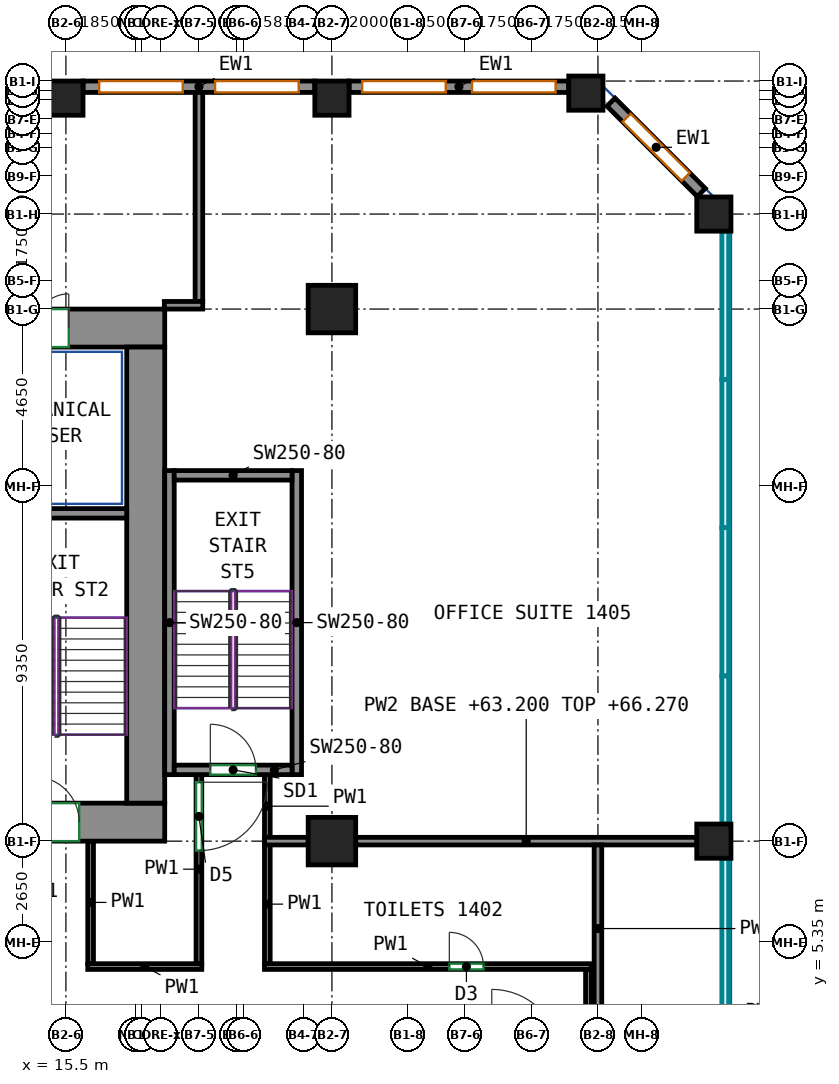
"""IFC4 building model, lengths in metres.
Left out: names, types, materials, properties, quantities, classifications, styles, units other than length and angle.
Written with IfcOpenShell. Run it as: python <this file> out.ifc"""

import sys

from ifc_helpers import new_model, si_unit, direction, frame, frame_2d, origin, origin_2d, place, context, subcontext, project, spatial, rectangle, extrude, source, transform, mapped, element, fill, save


model = new_model("IFC4")
c1 = context("Model", 3, precision=1e-05, world=origin(), true_north=direction((0.0, 1.0)))
c2 = subcontext(c1, "Body", "Model", "MODEL_VIEW")
j1 = project(units=[si_unit("LENGTHUNIT", "METRE"), si_unit("PLANEANGLEUNIT", "RADIAN")], contexts=[c1])
p1 = place(None, origin())
s1 = spatial("IfcSite", under=j1, at=p1, CompositionType="ELEMENT")
p2 = place(p1, origin())
s2 = spatial("IfcBuilding", under=s1, at=p2, CompositionType="ELEMENT")
p3 = place(p2, frame((0.0, 0.0, 63.2)))
s3 = spatial("IfcBuildingStorey", under=s2, at=p3, CompositionType="ELEMENT", Elevation=63.2)
m1 = source(origin(), c2, "Body", "SweptSolid", [
    extrude(rectangle(XDim=0.9, YDim=0.9, at=origin_2d()), origin(), (0.0, 0.0, 1.0), 3.72),
])
p4 = place(p3, frame((15.5, 27.55, 0.0), z_axis=(0.0, 0.0, 1.0), x_axis=(1.0, 0.0, 0.0)))
e1 = element("IfcColumn", 1, at=p4, inside=s3, PredefinedType="COLUMN", context=c2, shape_type="MappedRepresentation", body=[
    mapped(m1, transform((0.0, 0.0, 0.0))),
])
m2 = source(origin(), c2, "Body", "SweptSolid", [
    extrude(rectangle(XDim=1.25, YDim=1.25, at=origin_2d()), origin(), (0.0, 0.0, 1.0), 3.72),
])
for number, where, z_axis, x_axis in (
    (2, (22.5, 8.0, 0.0), (0.0, 0.0, 1.0), (1.0, 0.0, 0.0)),
    (3, (22.5, 22.0, 0.0), (0.0, 0.0, 1.0), (1.0, 0.0, 0.0)),
):
    element("IfcColumn", number, at=place(p3, frame(where, z_axis=z_axis, x_axis=x_axis)), inside=s3, PredefinedType="COLUMN", context=c2, shape_type="MappedRepresentation", body=[
        mapped(m2, transform((0.0, 0.0, 0.0))),
    ])
for number, where, z_axis, x_axis in (
    (4, (22.5, 27.55, 0.0), (0.0, 0.0, 1.0), (1.0, 0.0, 0.0)),
    (5, (29.182, 27.682, 0.0), (0.0, 0.0, 1.0), (1.0, 0.0, 0.0)),
    (6, (32.55, 8.0, 0.0), (0.0, 0.0, 1.0), (1.0, 0.0, 0.0)),
    (7, (32.55, 24.5, 0.0), (0.0, 0.0, 1.0), (1.0, 0.0, 0.0)),
):
    element("IfcColumn", number, at=place(p3, frame(where, z_axis=z_axis, x_axis=x_axis)), inside=s3, PredefinedType="COLUMN", context=c2, shape_type="MappedRepresentation", body=[
        mapped(m1, transform((0.0, 0.0, 0.0))),
    ])
m3 = source(origin(), c2, "Body", "SweptSolid", [
    extrude(rectangle(XDim=5.63, YDim=1.0, at=frame_2d((2.815, 0.0))), origin(), (0.0, 0.0, 1.0), 3.72),
])
p5 = place(p3, frame((12.47, 8.5, 0.0), z_axis=(0.0, 0.0, 1.0), x_axis=(1.0, 0.0, 0.0)))
e8 = element("IfcWall", 8, at=p5, inside=s3, PredefinedType="SHEAR", context=c2, shape_type="MappedRepresentation", body=[
    mapped(m3, transform((0.0, 0.0, 0.0))),
])
p6 = place(p5, frame((2.18, 0.0, 0.0)))
e9 = element("IfcOpeningElement", 9, at=p6, cuts=e8, PredefinedType="OPENING", context=c2, shape_type="SweptSolid", body=[
    extrude(rectangle(XDim=1.2, YDim=2.1, at=frame_2d((0.6, 1.05))), frame((0.0, 0.51, 0.0), z_axis=(0.0, -1.0, 0.0), x_axis=(1.0, 0.0, 0.0)), (0.0, 0.0, 1.0), 1.02),
])
m4 = source(origin(), c2, "Body", "SweptSolid", [
    extrude(rectangle(XDim=34.1, YDim=1.0, at=frame_2d((17.05, 0.0))), origin(), (0.0, 0.0, 1.0), 3.72),
])
p7 = place(p3, frame((-16.0, 21.5, 0.0), z_axis=(0.0, 0.0, 1.0), x_axis=(1.0, 0.0, 0.0)))
e10 = element("IfcWall", 10, at=p7, inside=s3, PredefinedType="SHEAR", context=c2, shape_type="MappedRepresentation", body=[
    mapped(m4, transform((0.0, 0.0, 0.0))),
])
p8 = place(p7, frame((6.108, 0.0, 0.0)))
e11 = element("IfcOpeningElement", 11, at=p8, cuts=e10, PredefinedType="OPENING", context=c2, shape_type="SweptSolid", body=[
    extrude(rectangle(XDim=0.9, YDim=2.1, at=frame_2d((0.45, 1.05))), frame((0.0, 0.51, 0.0), z_axis=(0.0, -1.0, 0.0), x_axis=(1.0, 0.0, 0.0)), (0.0, 0.0, 1.0), 1.02),
])
p9 = place(p7, frame((11.173, 0.0, 0.0)))
e12 = element("IfcOpeningElement", 12, at=p9, cuts=e10, PredefinedType="OPENING", context=c2, shape_type="SweptSolid", body=[
    extrude(rectangle(XDim=0.9, YDim=2.1, at=frame_2d((0.45, 1.05))), frame((0.0, 0.51, 0.0), z_axis=(0.0, -1.0, 0.0), x_axis=(1.0, 0.0, 0.0)), (0.0, 0.0, 1.0), 1.02),
])
p10 = place(p7, frame((16.238, 0.0, 0.0)))
e13 = element("IfcOpeningElement", 13, at=p10, cuts=e10, PredefinedType="OPENING", context=c2, shape_type="SweptSolid", body=[
    extrude(rectangle(XDim=0.9, YDim=2.1, at=frame_2d((0.45, 1.05))), frame((0.0, 0.51, 0.0), z_axis=(0.0, -1.0, 0.0), x_axis=(1.0, 0.0, 0.0)), (0.0, 0.0, 1.0), 1.02),
])
p11 = place(p7, frame((21.062, 0.0, 0.0)))
e14 = element("IfcOpeningElement", 14, at=p11, cuts=e10, PredefinedType="OPENING", context=c2, shape_type="SweptSolid", body=[
    extrude(rectangle(XDim=0.9, YDim=2.1, at=frame_2d((0.45, 1.05))), frame((0.0, 0.51, 0.0), z_axis=(0.0, -1.0, 0.0), x_axis=(1.0, 0.0, 0.0)), (0.0, 0.0, 1.0), 1.02),
])
p12 = place(p7, frame((26.489, 0.0, 0.0)))
e15 = element("IfcOpeningElement", 15, at=p12, cuts=e10, PredefinedType="OPENING", context=c2, shape_type="SweptSolid", body=[
    extrude(rectangle(XDim=0.9, YDim=2.1, at=frame_2d((0.45, 1.05))), frame((0.0, 0.51, 0.0), z_axis=(0.0, -1.0, 0.0), x_axis=(1.0, 0.0, 0.0)), (0.0, 0.0, 1.0), 1.02),
])
p13 = place(p7, frame((2.525, 0.0, 0.0)))
e16 = element("IfcOpeningElement", 16, at=p13, cuts=e10, PredefinedType="OPENING", context=c2, shape_type="SweptSolid", body=[
    extrude(rectangle(XDim=0.9, YDim=2.1, at=frame_2d((0.45, 1.05))), frame((0.0, 0.51, 0.0), z_axis=(0.0, -1.0, 0.0), x_axis=(1.0, 0.0, 0.0)), (0.0, 0.0, 1.0), 1.02),
])
p14 = place(p7, frame((30.675, 0.0, 0.0)))
e17 = element("IfcOpeningElement", 17, at=p14, cuts=e10, PredefinedType="OPENING", context=c2, shape_type="SweptSolid", body=[
    extrude(rectangle(XDim=0.9, YDim=2.1, at=frame_2d((0.45, 1.05))), frame((0.0, 0.51, 0.0), z_axis=(0.0, -1.0, 0.0), x_axis=(1.0, 0.0, 0.0)), (0.0, 0.0, 1.0), 1.02),
])
m5 = source(origin(), c2, "Body", "SweptSolid", [
    extrude(rectangle(XDim=12.0, YDim=1.0, at=frame_2d((6.0, 0.0))), origin(), (0.0, 0.0, 1.0), 3.72),
])
p15 = place(p3, frame((17.6, 9.0, 0.0), z_axis=(0.0, 0.0, 1.0), x_axis=(0.0, 1.0, 0.0)))
e18 = element("IfcWall", 18, at=p15, inside=s3, PredefinedType="SHEAR", context=c2, shape_type="MappedRepresentation", body=[
    mapped(m5, transform((0.0, 0.0, 0.0))),
])
m6 = source(origin(), c2, "Body", "SweptSolid", [
    extrude(rectangle(XDim=3.7, YDim=0.25, at=frame_2d((1.85, 0.0))), origin(), (0.0, 0.0, 1.0), 3.72),
])
p16 = place(p3, frame((13.4, 16.625, 0.0), z_axis=(0.0, 0.0, 1.0), x_axis=(1.0, 0.0, 0.0)))
e19 = element("IfcWall", 19, at=p16, inside=s3, PredefinedType="SHEAR", context=c2, shape_type="MappedRepresentation", body=[
    mapped(m6, transform((0.0, 0.0, 0.0))),
])
m7 = source(origin(), c2, "Body", "SweptSolid", [
    extrude(rectangle(XDim=8.0, YDim=0.25, at=frame_2d((4.0, 0.0))), origin(), (0.0, 0.0, 1.0), 3.72),
])
for number, where, z_axis, x_axis in (
    (20, (18.225, 9.75, 0.0), (0.0, 0.0, 1.0), (0.0, 1.0, 0.0)),
    (21, (21.575, 9.75, 0.0), (0.0, 0.0, 1.0), (0.0, 1.0, 0.0)),
):
    element("IfcWall", number, at=place(p3, frame(where, z_axis=z_axis, x_axis=x_axis)), inside=s3, PredefinedType="SHEAR", context=c2, shape_type="MappedRepresentation", body=[
        mapped(m7, transform((0.0, 0.0, 0.0))),
    ])
m8 = source(origin(), c2, "Body", "SweptSolid", [
    extrude(rectangle(XDim=3.1, YDim=0.25, at=frame_2d((1.55, 0.0))), origin(), (0.0, 0.0, 1.0), 3.72),
])
p17 = place(p3, frame((18.35, 9.875, 0.0), z_axis=(0.0, 0.0, 1.0), x_axis=(1.0, 0.0, 0.0)))
e22 = element("IfcWall", 22, at=p17, inside=s3, PredefinedType="SHEAR", context=c2, shape_type="MappedRepresentation", body=[
    mapped(m8, transform((0.0, 0.0, 0.0))),
])
p18 = place(p17, frame((0.95, 0.0, 0.0)))
e23 = element("IfcOpeningElement", 23, at=p18, cuts=e22, PredefinedType="OPENING", context=c2, shape_type="SweptSolid", body=[
    extrude(rectangle(XDim=1.2, YDim=2.1, at=frame_2d((0.6, 1.05))), frame((0.0, 0.135, 0.0), z_axis=(0.0, -1.0, 0.0), x_axis=(1.0, 0.0, 0.0)), (0.0, 0.0, 1.0), 0.27),
])
p19 = place(p3, frame((18.35, 17.625, 0.0), z_axis=(0.0, 0.0, 1.0), x_axis=(1.0, 0.0, 0.0)))
e24 = element("IfcWall", 24, at=p19, inside=s3, PredefinedType="SHEAR", context=c2, shape_type="MappedRepresentation", body=[
    mapped(m8, transform((0.0, 0.0, 0.0))),
])
m9 = source(origin(), c2, "Body", "SweptSolid", [
    extrude(rectangle(XDim=3.359, YDim=0.3, at=frame_2d((1.679, 0.0))), origin(), (0.0, 0.0, 1.0), 3.72),
])
p20 = place(p3, frame((32.219, 25.069, 0.0), z_axis=(0.0, 0.0, 1.0), x_axis=(-0.707070438228, 0.707143122278, 0.0)))
e25 = element("IfcWall", 25, at=p20, inside=s3, PredefinedType="SOLIDWALL", context=c2, shape_type="MappedRepresentation", body=[
    mapped(m9, transform((0.0, 0.0, 0.0))),
])
p21 = place(p20, frame((0.579, 0.0, 0.7)))
e26 = element("IfcOpeningElement", 26, at=p21, cuts=e25, PredefinedType="OPENING", context=c2, shape_type="SweptSolid", body=[
    extrude(rectangle(XDim=2.2, YDim=2.25, at=frame_2d((1.1, 1.125))), frame((0.0, 0.16, 0.0), z_axis=(0.0, -1.0, 0.0), x_axis=(1.0, 0.0, 0.0)), (0.0, 0.0, 1.0), 0.32),
])
m10 = source(origin(), c2, "Body", "SweptSolid", [
    extrude(rectangle(XDim=5.782, YDim=0.3, at=frame_2d((2.891, 0.0))), origin(), (0.0, 0.0, 1.0), 3.72),
])
p22 = place(p3, frame((28.732, 27.85, 0.0), z_axis=(0.0, 0.0, 1.0), x_axis=(-1.0, 0.0, 0.0)))
e27 = element("IfcWall", 27, at=p22, inside=s3, PredefinedType="SOLIDWALL", context=c2, shape_type="MappedRepresentation", body=[
    mapped(m10, transform((0.0, 0.0, 0.0))),
])
p23 = place(p22, frame((0.345, 0.0, 0.7)))
e28 = element("IfcOpeningElement", 28, at=p23, cuts=e27, PredefinedType="OPENING", context=c2, shape_type="SweptSolid", body=[
    extrude(rectangle(XDim=2.2, YDim=2.25, at=frame_2d((1.1, 1.125))), frame((0.0, 0.16, 0.0), z_axis=(0.0, -1.0, 0.0), x_axis=(1.0, 0.0, 0.0)), (0.0, 0.0, 1.0), 0.32),
])
p24 = place(p22, frame((3.236, 0.0, 0.7)))
e29 = element("IfcOpeningElement", 29, at=p24, cuts=e27, PredefinedType="OPENING", context=c2, shape_type="SweptSolid", body=[
    extrude(rectangle(XDim=2.2, YDim=2.25, at=frame_2d((1.1, 1.125))), frame((0.0, 0.16, 0.0), z_axis=(0.0, -1.0, 0.0), x_axis=(1.0, 0.0, 0.0)), (0.0, 0.0, 1.0), 0.32),
])
m11 = source(origin(), c2, "Body", "SweptSolid", [
    extrude(rectangle(XDim=6.1, YDim=0.3, at=frame_2d((3.05, 0.0))), origin(), (0.0, 0.0, 1.0), 3.72),
])
p25 = place(p3, frame((22.05, 27.85, 0.0), z_axis=(0.0, 0.0, 1.0), x_axis=(-1.0, 0.0, 0.0)))
e30 = element("IfcWall", 30, at=p25, inside=s3, PredefinedType="SOLIDWALL", context=c2, shape_type="MappedRepresentation", body=[
    mapped(m11, transform((0.0, 0.0, 0.0))),
])
p26 = place(p25, frame((0.425, 0.0, 0.7)))
e31 = element("IfcOpeningElement", 31, at=p26, cuts=e30, PredefinedType="OPENING", context=c2, shape_type="SweptSolid", body=[
    extrude(rectangle(XDim=2.2, YDim=2.25, at=frame_2d((1.1, 1.125))), frame((0.0, 0.16, 0.0), z_axis=(0.0, -1.0, 0.0), x_axis=(1.0, 0.0, 0.0)), (0.0, 0.0, 1.0), 0.32),
])
p27 = place(p25, frame((3.475, 0.0, 0.7)))
e32 = element("IfcOpeningElement", 32, at=p27, cuts=e30, PredefinedType="OPENING", context=c2, shape_type="SweptSolid", body=[
    extrude(rectangle(XDim=2.2, YDim=2.25, at=frame_2d((1.1, 1.125))), frame((0.0, 0.16, 0.0), z_axis=(0.0, -1.0, 0.0), x_axis=(1.0, 0.0, 0.0)), (0.0, 0.0, 1.0), 0.32),
])
p28 = place(p3, frame((16.15, 4.775, 0.0), z_axis=(0.0, 0.0, 1.0), x_axis=(0.0, 1.0, 0.0)))
e33 = element("IfcWall", 33, at=p28, inside=s3, PredefinedType="PARTITIONING", context=c2, shape_type="SweptSolid", body=[
    extrude(rectangle(XDim=3.225, YDim=0.15, at=frame_2d((1.613, 0.0))), origin(), (0.0, 0.0, 1.0), 3.72),
])
p29 = place(p3, frame((16.075, 4.7, 0.0), z_axis=(0.0, 0.0, 1.0), x_axis=(1.0, 0.0, 0.0)))
e34 = element("IfcWall", 34, at=p29, inside=s3, PredefinedType="PARTITIONING", context=c2, shape_type="SweptSolid", body=[
    extrude(rectangle(XDim=3.0, YDim=0.15, at=frame_2d((1.5, 0.0))), origin(), (0.0, 0.0, 1.0), 3.72),
])
p30 = place(p3, frame((19.0, 9.75, 0.0), z_axis=(0.0, 0.0, 1.0), x_axis=(0.0, -1.0, 0.0)))
e35 = element("IfcWall", 35, at=p30, inside=s3, PredefinedType="PARTITIONING", context=c2, shape_type="SweptSolid", body=[
    extrude(rectangle(XDim=4.975, YDim=0.15, at=frame_2d((2.488, 0.0))), origin(), (0.0, 0.0, 1.0), 3.72),
])
p31 = place(p30, frame((0.2, 0.0, 0.0)))
e36 = element("IfcOpeningElement", 36, at=p31, cuts=e35, PredefinedType="OPENING", context=c2, shape_type="SweptSolid", body=[
    extrude(rectangle(XDim=1.8, YDim=2.1, at=frame_2d((0.9, 1.05))), frame((0.0, 0.085, 0.0), z_axis=(0.0, -1.0, 0.0), x_axis=(1.0, 0.0, 0.0)), (0.0, 0.0, 1.0), 0.17),
])
p32 = place(p3, frame((20.8, 8.09, 0.0), z_axis=(0.0, 0.0, 1.0), x_axis=(0.0, 1.0, 0.0)))
e37 = element("IfcWall", 37, at=p32, inside=s3, PredefinedType="PARTITIONING", context=c2, shape_type="SweptSolid", body=[
    extrude(rectangle(XDim=1.66, YDim=0.15, at=frame_2d((0.83, 0.0))), origin(), (0.0, 0.0, 1.0), 3.72),
])
p33 = place(p3, frame((20.8, 4.775, 0.0), z_axis=(0.0, 0.0, 1.0), x_axis=(0.0, 1.0, 0.0)))
e38 = element("IfcWall", 38, at=p33, inside=s3, PredefinedType="PARTITIONING", context=c2, shape_type="SweptSolid", body=[
    extrude(rectangle(XDim=3.135, YDim=0.15, at=frame_2d((1.567, 0.0))), origin(), (0.0, 0.0, 1.0), 3.72),
])
p34 = place(p3, frame((20.725, 4.7, 0.0), z_axis=(0.0, 0.0, 1.0), x_axis=(1.0, 0.0, 0.0)))
e39 = element("IfcWall", 39, at=p34, inside=s3, PredefinedType="PARTITIONING", context=c2, shape_type="SweptSolid", body=[
    extrude(rectangle(XDim=8.6, YDim=0.15, at=frame_2d((4.3, 0.0))), origin(), (0.0, 0.0, 1.0), 3.72),
])
p35 = place(p34, frame((4.864, 0.0, 0.0)))
e40 = element("IfcOpeningElement", 40, at=p35, cuts=e39, PredefinedType="OPENING", context=c2, shape_type="SweptSolid", body=[
    extrude(rectangle(XDim=0.9, YDim=2.1, at=frame_2d((0.45, 1.05))), frame((0.0, 0.085, 0.0), z_axis=(0.0, -1.0, 0.0), x_axis=(1.0, 0.0, 0.0)), (0.0, 0.0, 1.0), 0.17),
])
p36 = place(p3, frame((29.25, 2.375, 0.0), z_axis=(0.0, 0.0, 1.0), x_axis=(0.0, 1.0, 0.0)))
e41 = element("IfcWall", 41, at=p36, inside=s3, PredefinedType="PARTITIONING", context=c2, shape_type="SweptSolid", body=[
    extrude(rectangle(XDim=2.25, YDim=0.15, at=frame_2d((1.125, 0.0))), origin(), (0.0, 0.0, 1.0), 3.07),
])
p37 = place(p3, frame((19.0, 22.2, 0.0), z_axis=(0.0, 0.0, 1.0), x_axis=(0.0, 1.0, 0.0)))
e42 = element("IfcWall", 42, at=p37, inside=s3, PredefinedType="PARTITIONING", context=c2, shape_type="SweptSolid", body=[
    extrude(rectangle(XDim=5.55, YDim=0.2, at=frame_2d((2.775, 0.0))), origin(), (0.0, 0.0, 1.0), 3.72),
])
p38 = place(p3, frame((18.09, 22.1, 0.0), z_axis=(0.0, 0.0, 1.0), x_axis=(1.0, 0.0, 0.0)))
e43 = element("IfcWall", 43, at=p38, inside=s3, PredefinedType="PARTITIONING", context=c2, shape_type="SweptSolid", body=[
    extrude(rectangle(XDim=1.01, YDim=0.2, at=frame_2d((0.505, 0.0))), origin(), (0.0, 0.0, 1.0), 3.72),
])
p39 = place(p3, frame((23.125, 8.0, 0.0), z_axis=(0.0, 0.0, 1.0), x_axis=(1.0, 0.0, 0.0)))
e44 = element("IfcWall", 44, at=p39, inside=s3, PredefinedType="PARTITIONING", context=c2, shape_type="SweptSolid", body=[
    extrude(rectangle(XDim=8.975, YDim=0.2, at=frame_2d((4.488, 0.0))), origin(), (0.0, 0.0, 1.0), 3.07),
])
p40 = place(p3, frame((20.726, 8.0, 0.0), z_axis=(0.0, 0.0, 1.0), x_axis=(1.0, 0.0, 0.0)))
e45 = element("IfcWall", 45, at=p40, inside=s3, PredefinedType="PARTITIONING", context=c2, shape_type="SweptSolid", body=[
    extrude(rectangle(XDim=1.149, YDim=0.2, at=frame_2d((0.574, 0.0))), origin(), (0.0, 0.0, 1.0), 3.72),
])
p41 = place(p3, frame((29.5, 3.5, 0.0), z_axis=(0.0, 0.0, 1.0), x_axis=(0.0, 1.0, 0.0)))
e46 = element("IfcWall", 46, at=p41, inside=s3, PredefinedType="PARTITIONING", context=c2, shape_type="SweptSolid", body=[
    extrude(rectangle(XDim=4.4, YDim=0.2, at=frame_2d((2.2, 0.0))), origin(), (0.0, 0.0, 1.0), 3.07),
])
p42 = place(p21, origin())
e47 = element("IfcWindow", 47, at=p42, inside=s3, PartitioningType="SINGLE_PANEL", PredefinedType="WINDOW", context=c2, shape_type="SweptSolid", body=[
    extrude(rectangle(XDim=2.2, YDim=2.25, at=frame_2d((1.1, 1.125))), frame((0.0, 0.03, 0.0), z_axis=(0.0, -1.0, 0.0), x_axis=(1.0, 0.0, 0.0)), (0.0, 0.0, 1.0), 0.06),
])
fill(e26, e47)
p43 = place(p23, origin())
e48 = element("IfcWindow", 48, at=p43, inside=s3, PartitioningType="SINGLE_PANEL", PredefinedType="WINDOW", context=c2, shape_type="SweptSolid", body=[
    extrude(rectangle(XDim=2.2, YDim=2.25, at=frame_2d((1.1, 1.125))), frame((0.0, 0.03, 0.0), z_axis=(0.0, -1.0, 0.0), x_axis=(1.0, 0.0, 0.0)), (0.0, 0.0, 1.0), 0.06),
])
fill(e28, e48)
p44 = place(p24, origin())
e49 = element("IfcWindow", 49, at=p44, inside=s3, PartitioningType="SINGLE_PANEL", PredefinedType="WINDOW", context=c2, shape_type="SweptSolid", body=[
    extrude(rectangle(XDim=2.2, YDim=2.25, at=frame_2d((1.1, 1.125))), frame((0.0, 0.03, 0.0), z_axis=(0.0, -1.0, 0.0), x_axis=(1.0, 0.0, 0.0)), (0.0, 0.0, 1.0), 0.06),
])
fill(e29, e49)
p45 = place(p26, origin())
e50 = element("IfcWindow", 50, at=p45, inside=s3, PartitioningType="SINGLE_PANEL", PredefinedType="WINDOW", context=c2, shape_type="SweptSolid", body=[
    extrude(rectangle(XDim=2.2, YDim=2.25, at=frame_2d((1.1, 1.125))), frame((0.0, 0.03, 0.0), z_axis=(0.0, -1.0, 0.0), x_axis=(1.0, 0.0, 0.0)), (0.0, 0.0, 1.0), 0.06),
])
fill(e31, e50)
p46 = place(p27, origin())
e51 = element("IfcWindow", 51, at=p46, inside=s3, PartitioningType="SINGLE_PANEL", PredefinedType="WINDOW", context=c2, shape_type="SweptSolid", body=[
    extrude(rectangle(XDim=2.2, YDim=2.25, at=frame_2d((1.1, 1.125))), frame((0.0, 0.03, 0.0), z_axis=(0.0, -1.0, 0.0), x_axis=(1.0, 0.0, 0.0)), (0.0, 0.0, 1.0), 0.06),
])
fill(e32, e51)
p47 = place(p14, origin())
e52 = element("IfcDoor", 52, at=p47, inside=s3, OperationType="SINGLE_SWING_RIGHT", PredefinedType="DOOR", context=c2, shape_type="SweptSolid", body=[
    extrude(rectangle(XDim=0.9, YDim=2.1, at=frame_2d((0.45, 1.05))), frame((0.0, -0.355, 0.0), z_axis=(0.0, -1.0, 0.0), x_axis=(1.0, 0.0, 0.0)), (0.0, 0.0, 1.0), 0.05),
])
fill(e17, e52)
p48 = place(p6, origin())
e53 = element("IfcDoor", 53, at=p48, inside=s3, OperationType="DOUBLE_DOOR_SINGLE_SWING", PredefinedType="DOOR", context=c2, shape_type="SweptSolid", body=[
    extrude(rectangle(XDim=1.2, YDim=2.1, at=frame_2d((0.6, 1.05))), frame((0.0, 0.405, 0.0), z_axis=(0.0, -1.0, 0.0), x_axis=(1.0, 0.0, 0.0)), (0.0, 0.0, 1.0), 0.05),
])
fill(e9, e53)
p49 = place(p18, origin())
e54 = element("IfcDoor", 54, at=p49, inside=s3, OperationType="DOUBLE_DOOR_SINGLE_SWING", PredefinedType="DOOR", context=c2, shape_type="SweptSolid", body=[
    extrude(rectangle(XDim=1.2, YDim=2.1, at=frame_2d((0.6, 1.05))), frame((0.0, 0.025, 0.0), z_axis=(0.0, -1.0, 0.0), x_axis=(1.0, 0.0, 0.0)), (0.0, 0.0, 1.0), 0.05),
])
fill(e23, e54)
p50 = place(p35, origin())
e55 = element("IfcDoor", 55, at=p50, inside=s3, OperationType="SINGLE_SWING_LEFT", PredefinedType="DOOR", context=c2, shape_type="SweptSolid", body=[
    extrude(rectangle(XDim=0.9, YDim=2.1, at=frame_2d((0.45, 1.05))), frame((0.0, 0.025, 0.0), z_axis=(0.0, -1.0, 0.0), x_axis=(1.0, 0.0, 0.0)), (0.0, 0.0, 1.0), 0.05),
])
fill(e40, e55)
p51 = place(p31, origin())
e56 = element("IfcDoor", 56, at=p51, inside=s3, OperationType="DOUBLE_DOOR_SINGLE_SWING", PredefinedType="DOOR", context=c2, shape_type="SweptSolid", body=[
    extrude(rectangle(XDim=1.8, YDim=2.1, at=frame_2d((0.9, 1.05))), frame((0.0, 0.025, 0.0), z_axis=(0.0, -1.0, 0.0), x_axis=(1.0, 0.0, 0.0)), (0.0, 0.0, 1.0), 0.05),
])
fill(e36, e56)
save(model, sys.argv[1])
